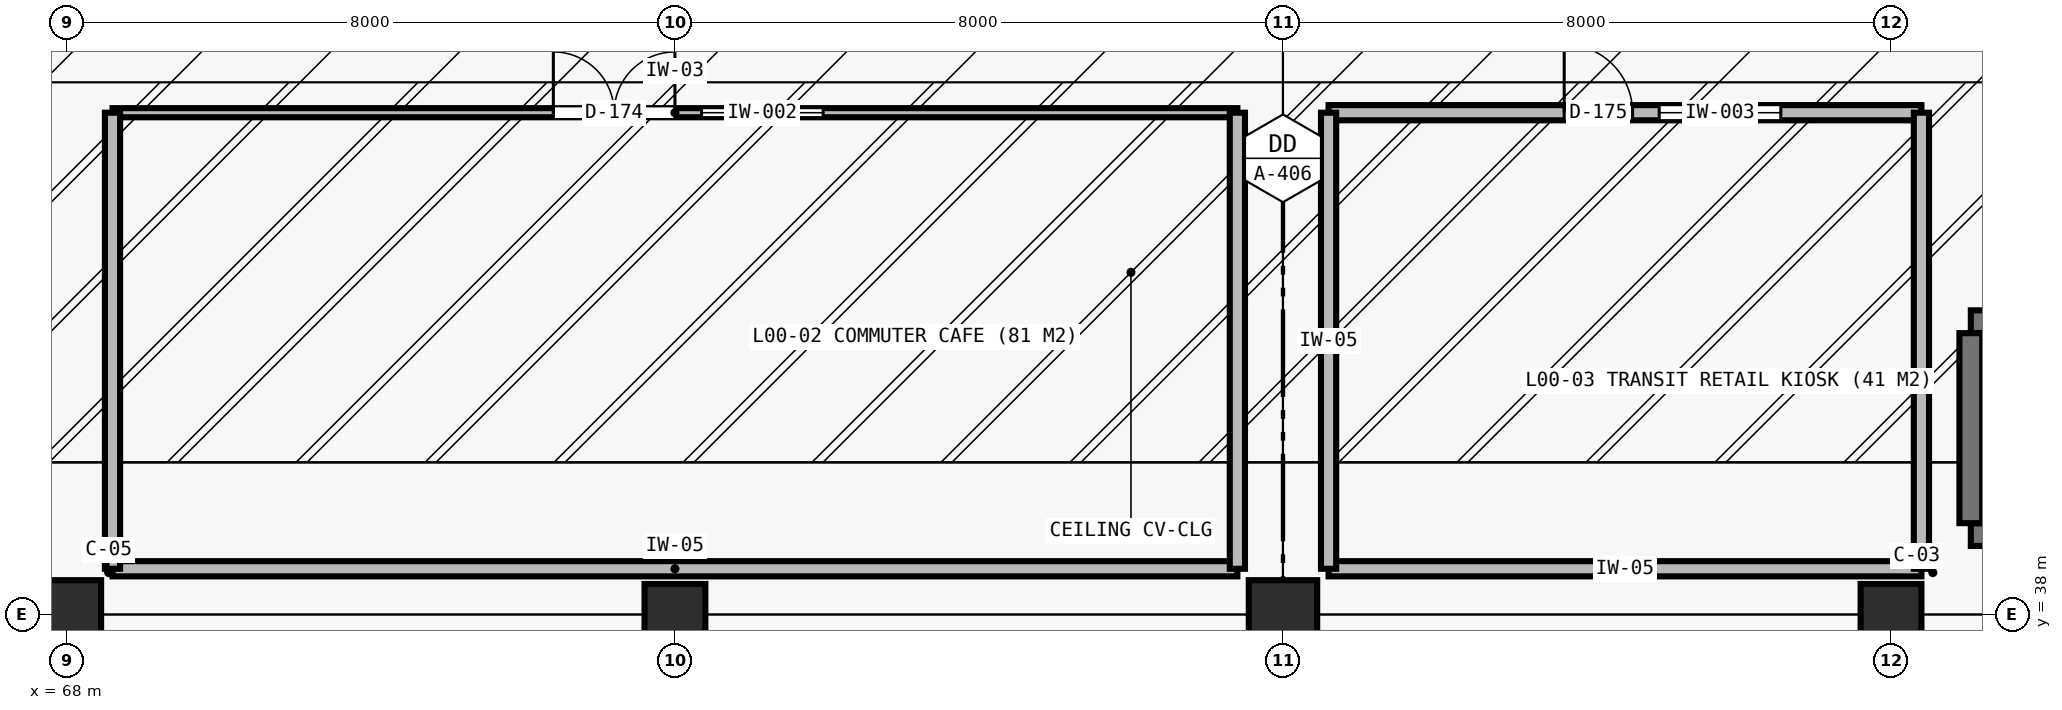
"""IFC4 building model, lengths in metres.
Left out: names, types, materials, properties, quantities, classifications, styles, units other than length and angle.
Written with IfcOpenShell. Run it as: python <this file> out.ifc"""

import sys

from ifc_helpers import new_model, si_unit, direction, frame, frame_2d, origin, origin_2d, place, context, subcontext, project, spatial, rectangle, extrude, element, fill, save


model = new_model("IFC4")
c1 = context("Model", 3, precision=1e-05, world=origin(), true_north=direction((0.0, 1.0)))
c2 = subcontext(c1, "Body", "Model", "MODEL_VIEW")
j1 = project(units=[si_unit("LENGTHUNIT", "METRE"), si_unit("PLANEANGLEUNIT", "RADIAN")], contexts=[c1])
p1 = place(None, origin())
s1 = spatial("IfcSite", under=j1, at=p1, CompositionType="ELEMENT")
p2 = place(p1, origin())
s2 = spatial("IfcBuilding", under=s1, at=p2, CompositionType="ELEMENT")
p3 = place(p2, origin())
s3 = spatial("IfcBuildingStorey", under=s2, at=p3, CompositionType="ELEMENT", Elevation=0.0)
p4 = place(p3, frame((68.0, 38.0, 0.0), z_axis=(0.0, 0.0, 1.0), x_axis=(1.0, 0.0, 0.0)))
e1 = element("IfcColumn", 1, at=p4, inside=s3, PredefinedType="COLUMN", context=c2, shape_type="SweptSolid", body=[
    extrude(rectangle(XDim=0.9, YDim=0.9, at=origin_2d()), origin(), (0.0, 0.0, 1.0), 6.02),
])
p5 = place(p3, frame((76.0, 38.0, 0.0), z_axis=(0.0, 0.0, 1.0), x_axis=(1.0, 0.0, 0.0)))
e2 = element("IfcColumn", 2, at=p5, inside=s3, PredefinedType="COLUMN", context=c2, shape_type="SweptSolid", body=[
    extrude(rectangle(XDim=0.8, YDim=0.8, at=origin_2d()), origin(), (0.0, 0.0, 1.0), 6.02),
])
p6 = place(p3, frame((84.0, 38.0, 0.0), z_axis=(0.0, 0.0, 1.0), x_axis=(1.0, 0.0, 0.0)))
e3 = element("IfcColumn", 3, at=p6, inside=s3, PredefinedType="COLUMN", context=c2, shape_type="SweptSolid", body=[
    extrude(rectangle(XDim=0.9, YDim=0.9, at=origin_2d()), origin(), (0.0, 0.0, 1.0), 6.02),
])
p7 = place(p3, frame((92.0, 38.0, 0.0), z_axis=(0.0, 0.0, 1.0), x_axis=(1.0, 0.0, 0.0)))
e4 = element("IfcColumn", 4, at=p7, inside=s3, PredefinedType="COLUMN", context=c2, shape_type="SweptSolid", body=[
    extrude(rectangle(XDim=0.8, YDim=0.8, at=origin_2d()), origin(), (0.0, 0.0, 1.0), 6.02),
])
p8 = place(p3, frame((93.05, 41.85, 0.0), z_axis=(0.0, 0.0, 1.0), x_axis=(1.0, 0.0, 0.0)))
e5 = element("IfcWall", 5, at=p8, inside=s3, PredefinedType="SHEAR", context=c2, shape_type="SweptSolid", body=[
    extrude(rectangle(XDim=2.5, YDim=0.3, at=frame_2d((1.25, 0.0))), origin(), (0.0, 0.0, 1.0), 6.02),
])
p9 = place(p8, frame((0.7, 0.0, 0.0)))
e6 = element("IfcOpeningElement", 6, at=p9, cuts=e5, PredefinedType="OPENING", context=c2, shape_type="SweptSolid", body=[
    extrude(rectangle(XDim=1.08, YDim=2.2, at=frame_2d((0.54, 1.1))), frame((0.0, 0.16, 0.0), z_axis=(0.0, -1.0, 0.0), x_axis=(1.0, 0.0, 0.0)), (0.0, 0.0, 1.0), 0.32),
])
for number, where, z_axis, x_axis in (
    (7, (93.05, 39.05, 0.0), (0.0, 0.0, 1.0), (1.0, 0.0, 0.0)),
    (8, (93.05, 39.2, 0.0), (0.0, 0.0, 1.0), (0.0, 1.0, 0.0)),
):
    element("IfcWall", number, at=place(p3, frame(where, z_axis=z_axis, x_axis=x_axis)), inside=s3, PredefinedType="SHEAR", context=c2, shape_type="SweptSolid", body=[
        extrude(rectangle(XDim=2.5, YDim=0.3, at=frame_2d((1.25, 0.0))), origin(), (0.0, 0.0, 1.0), 6.02),
    ])
p10 = place(p3, frame((68.6, 44.6, 0.0), z_axis=(0.0, 0.0, 1.0), x_axis=(1.0, 0.0, 0.0)))
e9 = element("IfcWall", 9, at=p10, inside=s3, PredefinedType="PARTITIONING", context=c2, shape_type="SweptSolid", body=[
    extrude(rectangle(XDim=14.8, YDim=0.12, at=frame_2d((7.4, 0.0))), origin(), (0.0, 0.0, 1.0), 6.02),
])
p11 = place(p10, frame((5.8, 0.0, 0.0)))
e10 = element("IfcOpeningElement", 10, at=p11, cuts=e9, PredefinedType="OPENING", context=c2, shape_type="SweptSolid", body=[
    extrude(rectangle(XDim=1.6, YDim=2.2, at=frame_2d((0.8, 1.1))), frame((0.0, 0.07, 0.0), z_axis=(0.0, -1.0, 0.0), x_axis=(1.0, 0.0, 0.0)), (0.0, 0.0, 1.0), 0.14),
])
p12 = place(p10, frame((7.75, 0.0, 0.95)))
e11 = element("IfcOpeningElement", 11, at=p12, cuts=e9, PredefinedType="OPENING", context=c2, shape_type="SweptSolid", body=[
    extrude(rectangle(XDim=1.6, YDim=1.3, at=frame_2d((0.8, 0.65))), frame((0.0, 0.07, 0.0), z_axis=(0.0, -1.0, 0.0), x_axis=(1.0, 0.0, 0.0)), (0.0, 0.0, 1.0), 0.14),
])
p13 = place(p3, frame((68.6, 38.6, 0.0), z_axis=(0.0, 0.0, 1.0), x_axis=(1.0, 0.0, 0.0)))
e12 = element("IfcWall", 12, at=p13, inside=s3, PredefinedType="SOLIDWALL", context=c2, shape_type="SweptSolid", body=[
    extrude(rectangle(XDim=14.8, YDim=0.2, at=frame_2d((7.4, 0.0))), origin(), (0.0, 0.0, 1.0), 6.02),
])
for number, where, z_axis, x_axis in (
    (13, (68.6, 38.6, 0.0), (0.0, 0.0, 1.0), (0.0, 1.0, 0.0)),
    (14, (83.4, 38.6, 0.0), (0.0, 0.0, 1.0), (0.0, 1.0, 0.0)),
):
    element("IfcWall", number, at=place(p3, frame(where, z_axis=z_axis, x_axis=x_axis)), inside=s3, PredefinedType="SOLIDWALL", context=c2, shape_type="SweptSolid", body=[
        extrude(rectangle(XDim=6.0, YDim=0.2, at=frame_2d((3.0, 0.0))), origin(), (0.0, 0.0, 1.0), 6.02),
    ])
p14 = place(p3, frame((84.6, 44.6, 0.0), z_axis=(0.0, 0.0, 1.0), x_axis=(1.0, 0.0, 0.0)))
e15 = element("IfcWall", 15, at=p14, inside=s3, PredefinedType="SOLIDWALL", context=c2, shape_type="SweptSolid", body=[
    extrude(rectangle(XDim=7.8, YDim=0.2, at=frame_2d((3.9, 0.0))), origin(), (0.0, 0.0, 1.0), 6.02),
])
p15 = place(p14, frame((3.1, 0.0, 0.0)))
e16 = element("IfcOpeningElement", 16, at=p15, cuts=e15, PredefinedType="OPENING", context=c2, shape_type="SweptSolid", body=[
    extrude(rectangle(XDim=0.9, YDim=2.1, at=frame_2d((0.45, 1.05))), frame((0.0, 0.11, 0.0), z_axis=(0.0, -1.0, 0.0), x_axis=(1.0, 0.0, 0.0)), (0.0, 0.0, 1.0), 0.22),
])
p16 = place(p14, frame((4.35, 0.0, 0.95)))
e17 = element("IfcOpeningElement", 17, at=p16, cuts=e15, PredefinedType="OPENING", context=c2, shape_type="SweptSolid", body=[
    extrude(rectangle(XDim=1.6, YDim=1.3, at=frame_2d((0.8, 0.65))), frame((0.0, 0.11, 0.0), z_axis=(0.0, -1.0, 0.0), x_axis=(1.0, 0.0, 0.0)), (0.0, 0.0, 1.0), 0.22),
])
p17 = place(p3, frame((84.6, 38.6, 0.0), z_axis=(0.0, 0.0, 1.0), x_axis=(1.0, 0.0, 0.0)))
e18 = element("IfcWall", 18, at=p17, inside=s3, PredefinedType="SOLIDWALL", context=c2, shape_type="SweptSolid", body=[
    extrude(rectangle(XDim=7.8, YDim=0.2, at=frame_2d((3.9, 0.0))), origin(), (0.0, 0.0, 1.0), 6.02),
])
for number, where, z_axis, x_axis in (
    (19, (84.6, 38.6, 0.0), (0.0, 0.0, 1.0), (0.0, 1.0, 0.0)),
    (20, (92.4, 38.6, 0.0), (0.0, 0.0, 1.0), (0.0, 1.0, 0.0)),
):
    element("IfcWall", number, at=place(p3, frame(where, z_axis=z_axis, x_axis=x_axis)), inside=s3, PredefinedType="SOLIDWALL", context=c2, shape_type="SweptSolid", body=[
        extrude(rectangle(XDim=6.0, YDim=0.2, at=frame_2d((3.0, 0.0))), origin(), (0.0, 0.0, 1.0), 6.02),
    ])
p18 = place(p11, origin())
e21 = element("IfcDoor", 21, at=p18, inside=s3, OperationType="DOUBLE_DOOR_SINGLE_SWING", PredefinedType="DOOR", context=c2, shape_type="SweptSolid", body=[
    extrude(rectangle(XDim=1.6, YDim=2.2, at=frame_2d((0.8, 1.1))), frame((0.0, 0.025, 0.0), z_axis=(0.0, -1.0, 0.0), x_axis=(1.0, 0.0, 0.0)), (0.0, 0.0, 1.0), 0.05),
])
fill(e10, e21)
p19 = place(p12, origin())
e22 = element("IfcWindow", 22, at=p19, inside=s3, PartitioningType="SINGLE_PANEL", PredefinedType="WINDOW", context=c2, shape_type="SweptSolid", body=[
    extrude(rectangle(XDim=1.6, YDim=1.3, at=frame_2d((0.8, 0.65))), frame((0.0, 0.03, 0.0), z_axis=(0.0, -1.0, 0.0), x_axis=(1.0, 0.0, 0.0)), (0.0, 0.0, 1.0), 0.06),
])
fill(e11, e22)
p20 = place(p15, origin())
e23 = element("IfcDoor", 23, at=p20, inside=s3, OperationType="SINGLE_SWING_LEFT", PredefinedType="DOOR", context=c2, shape_type="SweptSolid", body=[
    extrude(rectangle(XDim=0.9, YDim=2.1, at=frame_2d((0.45, 1.05))), frame((0.0, 0.025, 0.0), z_axis=(0.0, -1.0, 0.0), x_axis=(1.0, 0.0, 0.0)), (0.0, 0.0, 1.0), 0.05),
])
fill(e16, e23)
p21 = place(p16, origin())
e24 = element("IfcWindow", 24, at=p21, inside=s3, PartitioningType="SINGLE_PANEL", PredefinedType="WINDOW", context=c2, shape_type="SweptSolid", body=[
    extrude(rectangle(XDim=1.6, YDim=1.3, at=frame_2d((0.8, 0.65))), frame((0.0, 0.03, 0.0), z_axis=(0.0, -1.0, 0.0), x_axis=(1.0, 0.0, 0.0)), (0.0, 0.0, 1.0), 0.06),
])
fill(e17, e24)
save(model, sys.argv[1])
